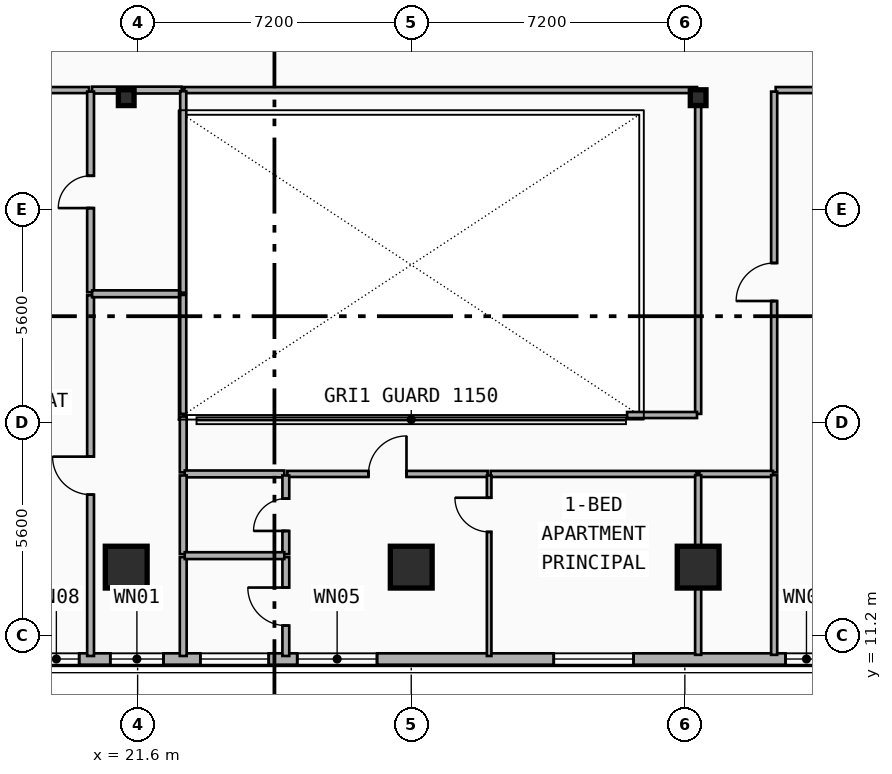
"""IFC4 building model, lengths in metres.
Left out: names, types, materials, properties, quantities, classifications, styles, units other than length and angle.
Written with IfcOpenShell. Run it as: python <this file> out.ifc"""

import sys

from ifc_helpers import new_model, si_unit, direction, frame, frame_2d, origin, origin_2d, place, context, subcontext, project, spatial, rectangle, i_section, extrude, element, fill, save


model = new_model("IFC4")
c1 = context("Model", 3, precision=1e-05, world=origin(), true_north=direction((0.0, 1.0)))
c2 = subcontext(c1, "Body", "Model", "MODEL_VIEW")
j1 = project(units=[si_unit("LENGTHUNIT", "METRE"), si_unit("PLANEANGLEUNIT", "RADIAN")], contexts=[c1])
p1 = place(None, origin())
s1 = spatial("IfcSite", under=j1, at=p1, CompositionType="ELEMENT")
p2 = place(p1, origin())
s2 = spatial("IfcBuilding", under=s1, at=p2, CompositionType="ELEMENT")
p3 = place(p2, frame((0.0, 0.0, 144.8)))
s3 = spatial("IfcBuildingStorey", under=s2, at=p3, CompositionType="ELEMENT", Elevation=144.8)
for number, where, z_axis, x_axis in (
    (1, (21.3, 25.35, 0.0), (0.0, 0.0, 1.0), (1.0, 0.0, 0.0)),
    (2, (36.35, 25.35, 0.0), (0.0, 0.0, 1.0), (1.0, 0.0, 0.0)),
):
    element("IfcColumn", number, at=place(p3, frame(where, z_axis=z_axis, x_axis=x_axis)), inside=s3, PredefinedType="COLUMN", context=c2, shape_type="SweptSolid", body=[
        extrude(i_section(OverallWidth=0.413, OverallDepth=0.415, WebThickness=0.03, FlangeThickness=0.047, FilletRadius=0.015, at=origin_2d()), origin(), (0.0, 0.0, 1.0), 3.55),
    ])
for number, where, z_axis, x_axis in (
    (3, (21.3, 13.106, 0.0), (0.0, -0.09, 0.996), (1.0, 0.0, 0.0)),
    (4, (28.8, 13.106, 0.0), (0.0, -0.09, 0.996), (1.0, 0.0, 0.0)),
    (5, (36.35, 13.106, 0.0), (0.0, -0.09, 0.996), (1.0, 0.0, 0.0)),
):
    element("IfcColumn", number, at=place(p3, frame(where, z_axis=z_axis, x_axis=x_axis)), inside=s3, PredefinedType="COLUMN", context=c2, shape_type="SweptSolid", body=[
        extrude(rectangle(XDim=1.1, YDim=1.1, at=origin_2d()), origin(), (0.0, 0.0, 1.0), 3.565),
    ])
p4 = place(p3, frame((48.0, 10.58, 0.0), z_axis=(0.0, 0.0, 1.0), x_axis=(-1.0, 0.0, 0.0)))
e6 = element("IfcWall", 6, at=p4, inside=s3, PredefinedType="SOLIDWALL", context=c2, shape_type="SweptSolid", body=[
    extrude(rectangle(XDim=38.4, YDim=0.3, at=frame_2d((19.2, 0.0))), origin(), (0.0, 0.0, 1.0), 3.29),
])
p5 = place(p4, frame((36.19, 0.0, 0.34)))
e7 = element("IfcOpeningElement", 7, at=p5, cuts=e6, PredefinedType="OPENING", context=c2, shape_type="SweptSolid", body=[
    extrude(rectangle(XDim=1.8, YDim=1.8, at=frame_2d((0.9, 0.9))), frame((0.0, 0.16, 0.0), z_axis=(0.0, -1.0, 0.0), x_axis=(1.0, 0.0, 0.0)), (0.0, 0.0, 1.0), 0.32),
])
p6 = place(p4, frame((27.938, 0.0, 0.34)))
e8 = element("IfcOpeningElement", 8, at=p6, cuts=e6, PredefinedType="OPENING", context=c2, shape_type="SweptSolid", body=[
    extrude(rectangle(XDim=1.2, YDim=1.5, at=frame_2d((0.6, 0.75))), frame((0.0, 0.16, 0.0), z_axis=(0.0, -1.0, 0.0), x_axis=(1.0, 0.0, 0.0)), (0.0, 0.0, 1.0), 0.32),
])
p7 = place(p4, frame((25.719, 0.0, 0.34)))
e9 = element("IfcOpeningElement", 9, at=p7, cuts=e6, PredefinedType="OPENING", context=c2, shape_type="SweptSolid", body=[
    extrude(rectangle(XDim=1.4, YDim=1.8, at=frame_2d((0.7, 0.9))), frame((0.0, 0.16, 0.0), z_axis=(0.0, -1.0, 0.0), x_axis=(1.0, 0.0, 0.0)), (0.0, 0.0, 1.0), 0.32),
])
p8 = place(p4, frame((33.861, 0.0, 1.22)))
e10 = element("IfcOpeningElement", 10, at=p8, cuts=e6, PredefinedType="OPENING", context=c2, shape_type="SweptSolid", body=[
    extrude(rectangle(XDim=1.2, YDim=1.5, at=frame_2d((0.6, 0.75))), frame((0.0, 0.16, 0.0), z_axis=(0.0, -1.0, 0.0), x_axis=(1.0, 0.0, 0.0)), (0.0, 0.0, 1.0), 0.32),
])
p9 = place(p4, frame((20.1, 0.0, 0.65)))
e11 = element("IfcOpeningElement", 11, at=p9, cuts=e6, PredefinedType="OPENING", context=c2, shape_type="SweptSolid", body=[
    extrude(rectangle(XDim=2.1, YDim=2.1, at=frame_2d((1.05, 1.05))), frame((0.0, 0.16, 0.0), z_axis=(0.0, -1.0, 0.0), x_axis=(1.0, 0.0, 0.0)), (0.0, 0.0, 1.0), 0.32),
])
p10 = place(p4, frame((22.95, 0.0, 0.8)))
e12 = element("IfcOpeningElement", 12, at=p10, cuts=e6, PredefinedType="OPENING", context=c2, shape_type="SweptSolid", body=[
    extrude(rectangle(XDim=1.8, YDim=1.8, at=frame_2d((0.9, 0.9))), frame((0.0, 0.16, 0.0), z_axis=(0.0, -1.0, 0.0), x_axis=(1.0, 0.0, 0.0)), (0.0, 0.0, 1.0), 0.32),
])
p11 = place(p4, frame((13.35, 0.0, 0.65)))
e13 = element("IfcOpeningElement", 13, at=p11, cuts=e6, PredefinedType="OPENING", context=c2, shape_type="SweptSolid", body=[
    extrude(rectangle(XDim=2.1, YDim=2.1, at=frame_2d((1.05, 1.05))), frame((0.0, 0.16, 0.0), z_axis=(0.0, -1.0, 0.0), x_axis=(1.0, 0.0, 0.0)), (0.0, 0.0, 1.0), 0.32),
])
p12 = place(p4, frame((8.25, 0.0, 1.68)))
e14 = element("IfcOpeningElement", 14, at=p12, cuts=e6, PredefinedType="OPENING", context=c2, shape_type="SweptSolid", body=[
    extrude(rectangle(XDim=1.1, YDim=1.05, at=frame_2d((0.55, 0.525))), frame((0.0, 0.16, 0.0), z_axis=(0.0, -1.0, 0.0), x_axis=(1.0, 0.0, 0.0)), (0.0, 0.0, 1.0), 0.32),
])
p13 = place(p4, frame((2.9, 0.0, 0.34)))
e15 = element("IfcOpeningElement", 15, at=p13, cuts=e6, PredefinedType="OPENING", context=c2, shape_type="SweptSolid", body=[
    extrude(rectangle(XDim=1.4, YDim=1.8, at=frame_2d((0.7, 0.9))), frame((0.0, 0.16, 0.0), z_axis=(0.0, -1.0, 0.0), x_axis=(1.0, 0.0, 0.0)), (0.0, 0.0, 1.0), 0.32),
])
p14 = place(p4, frame((0.41, 0.0, 0.34)))
e16 = element("IfcOpeningElement", 16, at=p14, cuts=e6, PredefinedType="OPENING", context=c2, shape_type="SweptSolid", body=[
    extrude(rectangle(XDim=1.8, YDim=1.8, at=frame_2d((0.9, 0.9))), frame((0.0, 0.16, 0.0), z_axis=(0.0, -1.0, 0.0), x_axis=(1.0, 0.0, 0.0)), (0.0, 0.0, 1.0), 0.32),
])
p15 = place(p3, frame((16.48, 25.55, 0.0), z_axis=(0.0, 0.0, 1.0), x_axis=(1.0, 0.0, 0.0)))
e17 = element("IfcWall", 17, at=p15, inside=s3, PredefinedType="PARTITIONING", context=c2, shape_type="SweptSolid", body=[
    extrude(rectangle(XDim=3.842, YDim=0.16, at=frame_2d((1.921, 0.0))), origin(), (0.0, 0.0, 1.0), 3.29),
])
p16 = place(p15, frame((1.421, 0.0, 0.0)))
e18 = element("IfcOpeningElement", 18, at=p16, cuts=e17, PredefinedType="OPENING", context=c2, shape_type="SweptSolid", body=[
    extrude(rectangle(XDim=1.0, YDim=2.15, at=frame_2d((0.5, 1.075))), frame((0.0, 0.09, 0.0), z_axis=(0.0, -1.0, 0.0), x_axis=(1.0, 0.0, 0.0)), (0.0, 0.0, 1.0), 0.18),
])
p17 = place(p3, frame((20.402, 25.55, 0.0), z_axis=(0.0, 0.0, 1.0), x_axis=(1.0, 0.0, 0.0)))
e19 = element("IfcWall", 19, at=p17, inside=s3, PredefinedType="PLUMBINGWALL", context=c2, shape_type="SweptSolid", body=[
    extrude(rectangle(XDim=2.358, YDim=0.18, at=frame_2d((1.179, 0.0))), origin(), (0.0, 0.0, 1.0), 2.36),
])
p18 = place(p3, frame((38.39, 25.55, 0.0), z_axis=(0.0, 0.0, 1.0), x_axis=(1.0, 0.0, 0.0)))
e20 = element("IfcWall", 20, at=p18, inside=s3, PredefinedType="PARTITIONING", context=c2, shape_type="SweptSolid", body=[
    extrude(rectangle(XDim=3.233, YDim=0.16, at=frame_2d((1.617, 0.0))), origin(), (0.0, 0.0, 1.0), 3.29),
])
p19 = place(p18, frame((1.116, 0.0, 0.0)))
e21 = element("IfcOpeningElement", 21, at=p19, cuts=e20, PredefinedType="OPENING", context=c2, shape_type="SweptSolid", body=[
    extrude(rectangle(XDim=1.0, YDim=2.15, at=frame_2d((0.5, 1.075))), frame((0.0, 0.09, 0.0), z_axis=(0.0, -1.0, 0.0), x_axis=(1.0, 0.0, 0.0)), (0.0, 0.0, 1.0), 0.18),
])
p20 = place(p3, frame((38.35, 15.49, 0.0), z_axis=(0.0, 0.0, 1.0), x_axis=(0.0, 1.0, 0.0)))
e22 = element("IfcWall", 22, at=p20, inside=s3, PredefinedType="PARTITIONING", context=c2, shape_type="SweptSolid", body=[
    extrude(rectangle(XDim=10.02, YDim=0.16, at=frame_2d((5.01, 0.0))), origin(), (0.0, 0.0, 1.0), 2.72),
])
p21 = place(p20, frame((4.51, 0.0, 0.0)))
e23 = element("IfcOpeningElement", 23, at=p21, cuts=e22, PredefinedType="OPENING", context=c2, shape_type="SweptSolid", body=[
    extrude(rectangle(XDim=1.0, YDim=2.15, at=frame_2d((0.5, 1.075))), frame((0.0, 0.09, 0.0), z_axis=(0.0, -1.0, 0.0), x_axis=(1.0, 0.0, 0.0)), (0.0, 0.0, 1.0), 0.18),
])
p22 = place(p3, frame((22.8, 15.49, 0.0), z_axis=(0.0, 0.0, 1.0), x_axis=(0.0, 1.0, 0.0)))
e24 = element("IfcWall", 24, at=p22, inside=s3, PredefinedType="PLUMBINGWALL", context=c2, shape_type="SweptSolid", body=[
    extrude(rectangle(XDim=1.47, YDim=0.18, at=frame_2d((0.735, 0.0))), origin(), (0.0, 0.0, 1.0), 2.73),
])
p23 = place(p3, frame((25.54, 15.45, 0.0), z_axis=(0.0, 0.0, 1.0), x_axis=(1.0, 0.0, 0.0)))
e25 = element("IfcWall", 25, at=p23, inside=s3, PredefinedType="PARTITIONING", context=c2, shape_type="SweptSolid", body=[
    extrude(rectangle(XDim=5.27, YDim=0.16, at=frame_2d((2.635, 0.0))), origin(), (0.0, 0.0, 1.0), 2.36),
])
p24 = place(p23, frame((2.135, 0.0, 0.0)))
e26 = element("IfcOpeningElement", 26, at=p24, cuts=e25, PredefinedType="OPENING", context=c2, shape_type="SweptSolid", body=[
    extrude(rectangle(XDim=1.0, YDim=2.15, at=frame_2d((0.5, 1.075))), frame((0.0, 0.09, 0.0), z_axis=(0.0, -1.0, 0.0), x_axis=(1.0, 0.0, 0.0)), (0.0, 0.0, 1.0), 0.18),
])
p25 = place(p3, frame((22.84, 15.45, 0.0), z_axis=(0.0, 0.0, 1.0), x_axis=(1.0, 0.0, 0.0)))
e27 = element("IfcWall", 27, at=p25, inside=s3, PredefinedType="PLUMBINGWALL", context=c2, shape_type="SweptSolid", body=[
    extrude(rectangle(XDim=2.62, YDim=0.18, at=frame_2d((1.31, 0.0))), origin(), (0.0, 0.0, 1.0), 3.29),
])
p26 = place(p3, frame((30.89, 15.45, 0.0), z_axis=(0.0, 0.0, 1.0), x_axis=(1.0, 0.0, 0.0)))
e28 = element("IfcWall", 28, at=p26, inside=s3, PredefinedType="PARTITIONING", context=c2, shape_type="SweptSolid", body=[
    extrude(rectangle(XDim=5.42, YDim=0.16, at=frame_2d((2.71, 0.0))), origin(), (0.0, 0.0, 1.0), 2.36),
])
p27 = place(p3, frame((20.362, 10.66, 0.0), z_axis=(0.0, 0.0, 1.0), x_axis=(0.0, 1.0, 0.0)))
e29 = element("IfcWall", 29, at=p27, inside=s3, PredefinedType="PLUMBINGWALL", context=c2, shape_type="SweptSolid", body=[
    extrude(rectangle(XDim=9.49, YDim=0.18, at=frame_2d((4.745, 0.0))), origin(), (0.0, 0.0, 1.0), 2.72),
])
p28 = place(p27, frame((4.245, 0.0, 0.0)))
e30 = element("IfcOpeningElement", 30, at=p28, cuts=e29, PredefinedType="OPENING", context=c2, shape_type="SweptSolid", body=[
    extrude(rectangle(XDim=1.0, YDim=2.15, at=frame_2d((0.5, 1.075))), frame((0.0, 0.1, 0.0), z_axis=(0.0, -1.0, 0.0), x_axis=(1.0, 0.0, 0.0)), (0.0, 0.0, 1.0), 0.2),
])
p29 = place(p3, frame((20.362, 20.23, 0.0), z_axis=(0.0, 0.0, 1.0), x_axis=(0.0, 1.0, 0.0)))
e31 = element("IfcWall", 31, at=p29, inside=s3, PredefinedType="PLUMBINGWALL", context=c2, shape_type="SweptSolid", body=[
    extrude(rectangle(XDim=5.28, YDim=0.18, at=frame_2d((2.64, 0.0))), origin(), (0.0, 0.0, 1.0), 2.72),
])
p30 = place(p29, frame((2.215, 0.0, 0.0)))
e32 = element("IfcOpeningElement", 32, at=p30, cuts=e31, PredefinedType="OPENING", context=c2, shape_type="SweptSolid", body=[
    extrude(rectangle(XDim=0.85, YDim=2.1, at=frame_2d((0.425, 1.05))), frame((0.0, 0.1, 0.0), z_axis=(0.0, -1.0, 0.0), x_axis=(1.0, 0.0, 0.0)), (0.0, 0.0, 1.0), 0.2),
])
p31 = place(p3, frame((20.402, 20.19, 0.0), z_axis=(0.0, 0.0, 1.0), x_axis=(1.0, 0.0, 0.0)))
e33 = element("IfcWall", 33, at=p31, inside=s3, PredefinedType="PLUMBINGWALL", context=c2, shape_type="SweptSolid", body=[
    extrude(rectangle(XDim=2.358, YDim=0.18, at=frame_2d((1.179, 0.0))), origin(), (0.0, 0.0, 1.0), 2.36),
])
p32 = place(p3, frame((22.8, 10.66, 0.0), z_axis=(0.0, 0.0, 1.0), x_axis=(0.0, 1.0, 0.0)))
e34 = element("IfcWall", 34, at=p32, inside=s3, PredefinedType="PLUMBINGWALL", context=c2, shape_type="SweptSolid", body=[
    extrude(rectangle(XDim=2.6, YDim=0.18, at=frame_2d((1.3, 0.0))), origin(), (0.0, 0.0, 1.0), 2.91),
])
p33 = place(p3, frame((22.8, 13.34, 0.0), z_axis=(0.0, 0.0, 1.0), x_axis=(0.0, 1.0, 0.0)))
e35 = element("IfcWall", 35, at=p33, inside=s3, PredefinedType="PLUMBINGWALL", context=c2, shape_type="SweptSolid", body=[
    extrude(rectangle(XDim=2.07, YDim=0.18, at=frame_2d((1.035, 0.0))), origin(), (0.0, 0.0, 1.0), 2.91),
])
p34 = place(p3, frame((25.5, 10.66, 0.0), z_axis=(0.0, 0.0, 1.0), x_axis=(0.0, 1.0, 0.0)))
e36 = element("IfcWall", 36, at=p34, inside=s3, PredefinedType="PLUMBINGWALL", context=c2, shape_type="SweptSolid", body=[
    extrude(rectangle(XDim=2.6, YDim=0.18, at=frame_2d((1.3, 0.0))), origin(), (0.0, 0.0, 1.0), 2.91),
])
p35 = place(p34, frame((0.8, 0.0, 0.0)))
e37 = element("IfcOpeningElement", 37, at=p35, cuts=e36, PredefinedType="OPENING", context=c2, shape_type="SweptSolid", body=[
    extrude(rectangle(XDim=1.0, YDim=2.15, at=frame_2d((0.5, 1.075))), frame((0.0, 0.1, 0.0), z_axis=(0.0, -1.0, 0.0), x_axis=(1.0, 0.0, 0.0)), (0.0, 0.0, 1.0), 0.2),
])
p36 = place(p3, frame((25.5, 13.34, 0.0), z_axis=(0.0, 0.0, 1.0), x_axis=(0.0, 1.0, 0.0)))
e38 = element("IfcWall", 38, at=p36, inside=s3, PredefinedType="PLUMBINGWALL", context=c2, shape_type="SweptSolid", body=[
    extrude(rectangle(XDim=2.07, YDim=0.18, at=frame_2d((1.035, 0.0))), origin(), (0.0, 0.0, 1.0), 2.91),
])
p37 = place(p36, frame((0.61, 0.0, 0.0)))
e39 = element("IfcOpeningElement", 39, at=p37, cuts=e38, PredefinedType="OPENING", context=c2, shape_type="SweptSolid", body=[
    extrude(rectangle(XDim=0.85, YDim=2.1, at=frame_2d((0.425, 1.05))), frame((0.0, 0.1, 0.0), z_axis=(0.0, -1.0, 0.0), x_axis=(1.0, 0.0, 0.0)), (0.0, 0.0, 1.0), 0.2),
])
p38 = place(p3, frame((30.85, 10.66, 0.0), z_axis=(0.0, 0.0, 1.0), x_axis=(0.0, 1.0, 0.0)))
e40 = element("IfcWall", 40, at=p38, inside=s3, PredefinedType="PARTITIONING", context=c2, shape_type="SweptSolid", body=[
    extrude(rectangle(XDim=4.75, YDim=0.12, at=frame_2d((2.375, 0.0))), origin(), (0.0, 0.0, 1.0), 2.91),
])
p39 = place(p38, frame((3.264, 0.0, 0.0)))
e41 = element("IfcOpeningElement", 41, at=p39, cuts=e40, PredefinedType="OPENING", context=c2, shape_type="SweptSolid", body=[
    extrude(rectangle(XDim=0.9, YDim=2.1, at=frame_2d((0.45, 1.05))), frame((0.0, 0.07, 0.0), z_axis=(0.0, -1.0, 0.0), x_axis=(1.0, 0.0, 0.0)), (0.0, 0.0, 1.0), 0.14),
])
p40 = place(p3, frame((22.84, 13.3, 0.0), z_axis=(0.0, 0.0, 1.0), x_axis=(1.0, 0.0, 0.0)))
e42 = element("IfcWall", 42, at=p40, inside=s3, PredefinedType="PLUMBINGWALL", context=c2, shape_type="SweptSolid", body=[
    extrude(rectangle(XDim=2.62, YDim=0.18, at=frame_2d((1.31, 0.0))), origin(), (0.0, 0.0, 1.0), 2.91),
])
p41 = place(p3, frame((22.83, 25.55, 0.0), z_axis=(0.0, 0.0, 1.0), x_axis=(1.0, 0.0, 0.0)))
e43 = element("IfcWall", 43, at=p41, inside=s3, PredefinedType="PARTITIONING", context=c2, shape_type="SweptSolid", body=[
    extrude(rectangle(XDim=13.49, YDim=0.16, at=frame_2d((6.745, 0.0))), origin(), (0.0, 0.0, 1.0), 2.36),
])
p42 = place(p3, frame((36.38, 15.45, 0.0), z_axis=(0.0, 0.0, 1.0), x_axis=(1.0, 0.0, 0.0)))
e44 = element("IfcWall", 44, at=p42, inside=s3, PredefinedType="PARTITIONING", context=c2, shape_type="SweptSolid", body=[
    extrude(rectangle(XDim=1.94, YDim=0.16, at=frame_2d((0.97, 0.0))), origin(), (0.0, 0.0, 1.0), 2.36),
])
p43 = place(p3, frame((36.35, 17.03, 0.0), z_axis=(0.0, 0.0, 1.0), x_axis=(0.0, 1.0, 0.0)))
e45 = element("IfcWall", 45, at=p43, inside=s3, PredefinedType="PARTITIONING", context=c2, shape_type="SweptSolid", body=[
    extrude(rectangle(XDim=8.49, YDim=0.16, at=frame_2d((4.245, 0.0))), origin(), (0.0, 0.0, 1.0), 2.36),
])
p44 = place(p3, frame((34.48, 17.0, 0.0), z_axis=(0.0, 0.0, 1.0), x_axis=(1.0, 0.0, 0.0)))
e46 = element("IfcWall", 46, at=p44, inside=s3, PredefinedType="PARTITIONING", context=c2, shape_type="SweptSolid", body=[
    extrude(rectangle(XDim=1.84, YDim=0.16, at=frame_2d((0.92, 0.0))), origin(), (0.0, 0.0, 1.0), 2.36),
])
p45 = place(p3, frame((22.8, 17.03, 0.0), z_axis=(0.0, 0.0, 1.0), x_axis=(0.0, 1.0, 0.0)))
e47 = element("IfcWall", 47, at=p45, inside=s3, PredefinedType="PARTITIONING", context=c2, shape_type="SweptSolid", body=[
    extrude(rectangle(XDim=3.13, YDim=0.16, at=frame_2d((1.565, 0.0))), origin(), (0.0, 0.0, 1.0), 2.73),
])
p46 = place(p3, frame((22.8, 20.22, 0.0), z_axis=(0.0, 0.0, 1.0), x_axis=(0.0, 1.0, 0.0)))
e48 = element("IfcWall", 48, at=p46, inside=s3, PredefinedType="PARTITIONING", context=c2, shape_type="SweptSolid", body=[
    extrude(rectangle(XDim=5.3, YDim=0.16, at=frame_2d((2.65, 0.0))), origin(), (0.0, 0.0, 1.0), 3.29),
])
p47 = place(p3, frame((36.35, 10.69, 0.0), z_axis=(0.0, 0.0, 1.0), x_axis=(0.0, 1.0, 0.0)))
e49 = element("IfcWall", 49, at=p47, inside=s3, PredefinedType="PARTITIONING", context=c2, shape_type="SweptSolid", body=[
    extrude(rectangle(XDim=4.73, YDim=0.16, at=frame_2d((2.365, 0.0))), origin(), (0.0, 0.0, 1.0), 2.36),
])
p48 = place(p3, frame((38.35, 10.69, 0.0), z_axis=(0.0, 0.0, 1.0), x_axis=(0.0, 1.0, 0.0)))
e50 = element("IfcWall", 50, at=p48, inside=s3, PredefinedType="PARTITIONING", context=c2, shape_type="SweptSolid", body=[
    extrude(rectangle(XDim=4.73, YDim=0.16, at=frame_2d((2.365, 0.0))), origin(), (0.0, 0.0, 1.0), 2.91),
])
p49 = place(p6, origin())
e51 = element("IfcWindow", 51, at=p49, inside=s3, PartitioningType="SINGLE_PANEL", PredefinedType="WINDOW", context=c2, shape_type="SweptSolid", body=[
    extrude(rectangle(XDim=1.2, YDim=1.5, at=frame_2d((0.6, 0.75))), frame((0.0, 0.03, 0.0), z_axis=(0.0, -1.0, 0.0), x_axis=(1.0, 0.0, 0.0)), (0.0, 0.0, 1.0), 0.06),
])
fill(e8, e51)
p50 = place(p7, origin())
e52 = element("IfcWindow", 52, at=p50, inside=s3, PartitioningType="SINGLE_PANEL", PredefinedType="WINDOW", context=c2, shape_type="SweptSolid", body=[
    extrude(rectangle(XDim=1.4, YDim=1.8, at=frame_2d((0.7, 0.9))), frame((0.0, 0.03, 0.0), z_axis=(0.0, -1.0, 0.0), x_axis=(1.0, 0.0, 0.0)), (0.0, 0.0, 1.0), 0.06),
])
fill(e9, e52)
p51 = place(p9, origin())
e53 = element("IfcWindow", 53, at=p51, inside=s3, PartitioningType="SINGLE_PANEL", PredefinedType="WINDOW", context=c2, shape_type="SweptSolid", body=[
    extrude(rectangle(XDim=2.1, YDim=2.1, at=frame_2d((1.05, 1.05))), frame((0.0, 0.03, 0.0), z_axis=(0.0, -1.0, 0.0), x_axis=(1.0, 0.0, 0.0)), (0.0, 0.0, 1.0), 0.06),
])
fill(e11, e53)
p52 = place(p10, origin())
e54 = element("IfcWindow", 54, at=p52, inside=s3, PartitioningType="SINGLE_PANEL", PredefinedType="WINDOW", context=c2, shape_type="SweptSolid", body=[
    extrude(rectangle(XDim=1.8, YDim=1.8, at=frame_2d((0.9, 0.9))), frame((0.0, 0.03, 0.0), z_axis=(0.0, -1.0, 0.0), x_axis=(1.0, 0.0, 0.0)), (0.0, 0.0, 1.0), 0.06),
])
fill(e12, e54)
p53 = place(p11, origin())
e55 = element("IfcWindow", 55, at=p53, inside=s3, PartitioningType="SINGLE_PANEL", PredefinedType="WINDOW", context=c2, shape_type="SweptSolid", body=[
    extrude(rectangle(XDim=2.1, YDim=2.1, at=frame_2d((1.05, 1.05))), frame((0.0, 0.03, 0.0), z_axis=(0.0, -1.0, 0.0), x_axis=(1.0, 0.0, 0.0)), (0.0, 0.0, 1.0), 0.06),
])
fill(e13, e55)
p54 = place(p12, origin())
e56 = element("IfcWindow", 56, at=p54, inside=s3, PartitioningType="SINGLE_PANEL", PredefinedType="WINDOW", context=c2, shape_type="SweptSolid", body=[
    extrude(rectangle(XDim=1.1, YDim=1.05, at=frame_2d((0.55, 0.525))), frame((0.0, 0.03, 0.0), z_axis=(0.0, -1.0, 0.0), x_axis=(1.0, 0.0, 0.0)), (0.0, 0.0, 1.0), 0.06),
])
fill(e14, e56)
p55 = place(p21, origin())
e57 = element("IfcDoor", 57, at=p55, inside=s3, OperationType="SINGLE_SWING_LEFT", PredefinedType="DOOR", context=c2, shape_type="SweptSolid", body=[
    extrude(rectangle(XDim=1.0, YDim=2.15, at=frame_2d((0.5, 1.075))), frame((0.0, 0.025, 0.0), z_axis=(0.0, -1.0, 0.0), x_axis=(1.0, 0.0, 0.0)), (0.0, 0.0, 1.0), 0.05),
])
fill(e23, e57)
p56 = place(p24, origin())
e58 = element("IfcDoor", 58, at=p56, inside=s3, OperationType="SINGLE_SWING_RIGHT", PredefinedType="DOOR", context=c2, shape_type="SweptSolid", body=[
    extrude(rectangle(XDim=1.0, YDim=2.15, at=frame_2d((0.5, 1.075))), frame((0.0, 0.025, 0.0), z_axis=(0.0, -1.0, 0.0), x_axis=(1.0, 0.0, 0.0)), (0.0, 0.0, 1.0), 0.05),
])
fill(e26, e58)
p57 = place(p28, origin())
e59 = element("IfcDoor", 59, at=p57, inside=s3, OperationType="SINGLE_SWING_RIGHT", PredefinedType="DOOR", context=c2, shape_type="SweptSolid", body=[
    extrude(rectangle(XDim=1.0, YDim=2.15, at=frame_2d((0.5, 1.075))), frame((0.0, 0.025, 0.0), z_axis=(0.0, -1.0, 0.0), x_axis=(1.0, 0.0, 0.0)), (0.0, 0.0, 1.0), 0.05),
])
fill(e30, e59)
p58 = place(p30, origin())
e60 = element("IfcDoor", 60, at=p58, inside=s3, OperationType="SINGLE_SWING_LEFT", PredefinedType="DOOR", context=c2, shape_type="SweptSolid", body=[
    extrude(rectangle(XDim=0.85, YDim=2.1, at=frame_2d((0.425, 1.05))), frame((0.0, 0.025, 0.0), z_axis=(0.0, -1.0, 0.0), x_axis=(1.0, 0.0, 0.0)), (0.0, 0.0, 1.0), 0.05),
])
fill(e32, e60)
p59 = place(p35, origin())
e61 = element("IfcDoor", 61, at=p59, inside=s3, OperationType="SINGLE_SWING_RIGHT", PredefinedType="DOOR", context=c2, shape_type="SweptSolid", body=[
    extrude(rectangle(XDim=1.0, YDim=2.15, at=frame_2d((0.5, 1.075))), frame((0.0, 0.025, 0.0), z_axis=(0.0, -1.0, 0.0), x_axis=(1.0, 0.0, 0.0)), (0.0, 0.0, 1.0), 0.05),
])
fill(e37, e61)
p60 = place(p37, origin())
e62 = element("IfcDoor", 62, at=p60, inside=s3, OperationType="SINGLE_SWING_LEFT", PredefinedType="DOOR", context=c2, shape_type="SweptSolid", body=[
    extrude(rectangle(XDim=0.85, YDim=2.1, at=frame_2d((0.425, 1.05))), frame((0.0, 0.025, 0.0), z_axis=(0.0, -1.0, 0.0), x_axis=(1.0, 0.0, 0.0)), (0.0, 0.0, 1.0), 0.05),
])
fill(e39, e62)
p61 = place(p39, origin())
e63 = element("IfcDoor", 63, at=p61, inside=s3, OperationType="SINGLE_SWING_RIGHT", PredefinedType="DOOR", context=c2, shape_type="SweptSolid", body=[
    extrude(rectangle(XDim=0.9, YDim=2.1, at=frame_2d((0.45, 1.05))), frame((0.0, 0.025, 0.0), z_axis=(0.0, -1.0, 0.0), x_axis=(1.0, 0.0, 0.0)), (0.0, 0.0, 1.0), 0.05),
])
fill(e41, e63)
save(model, sys.argv[1])
